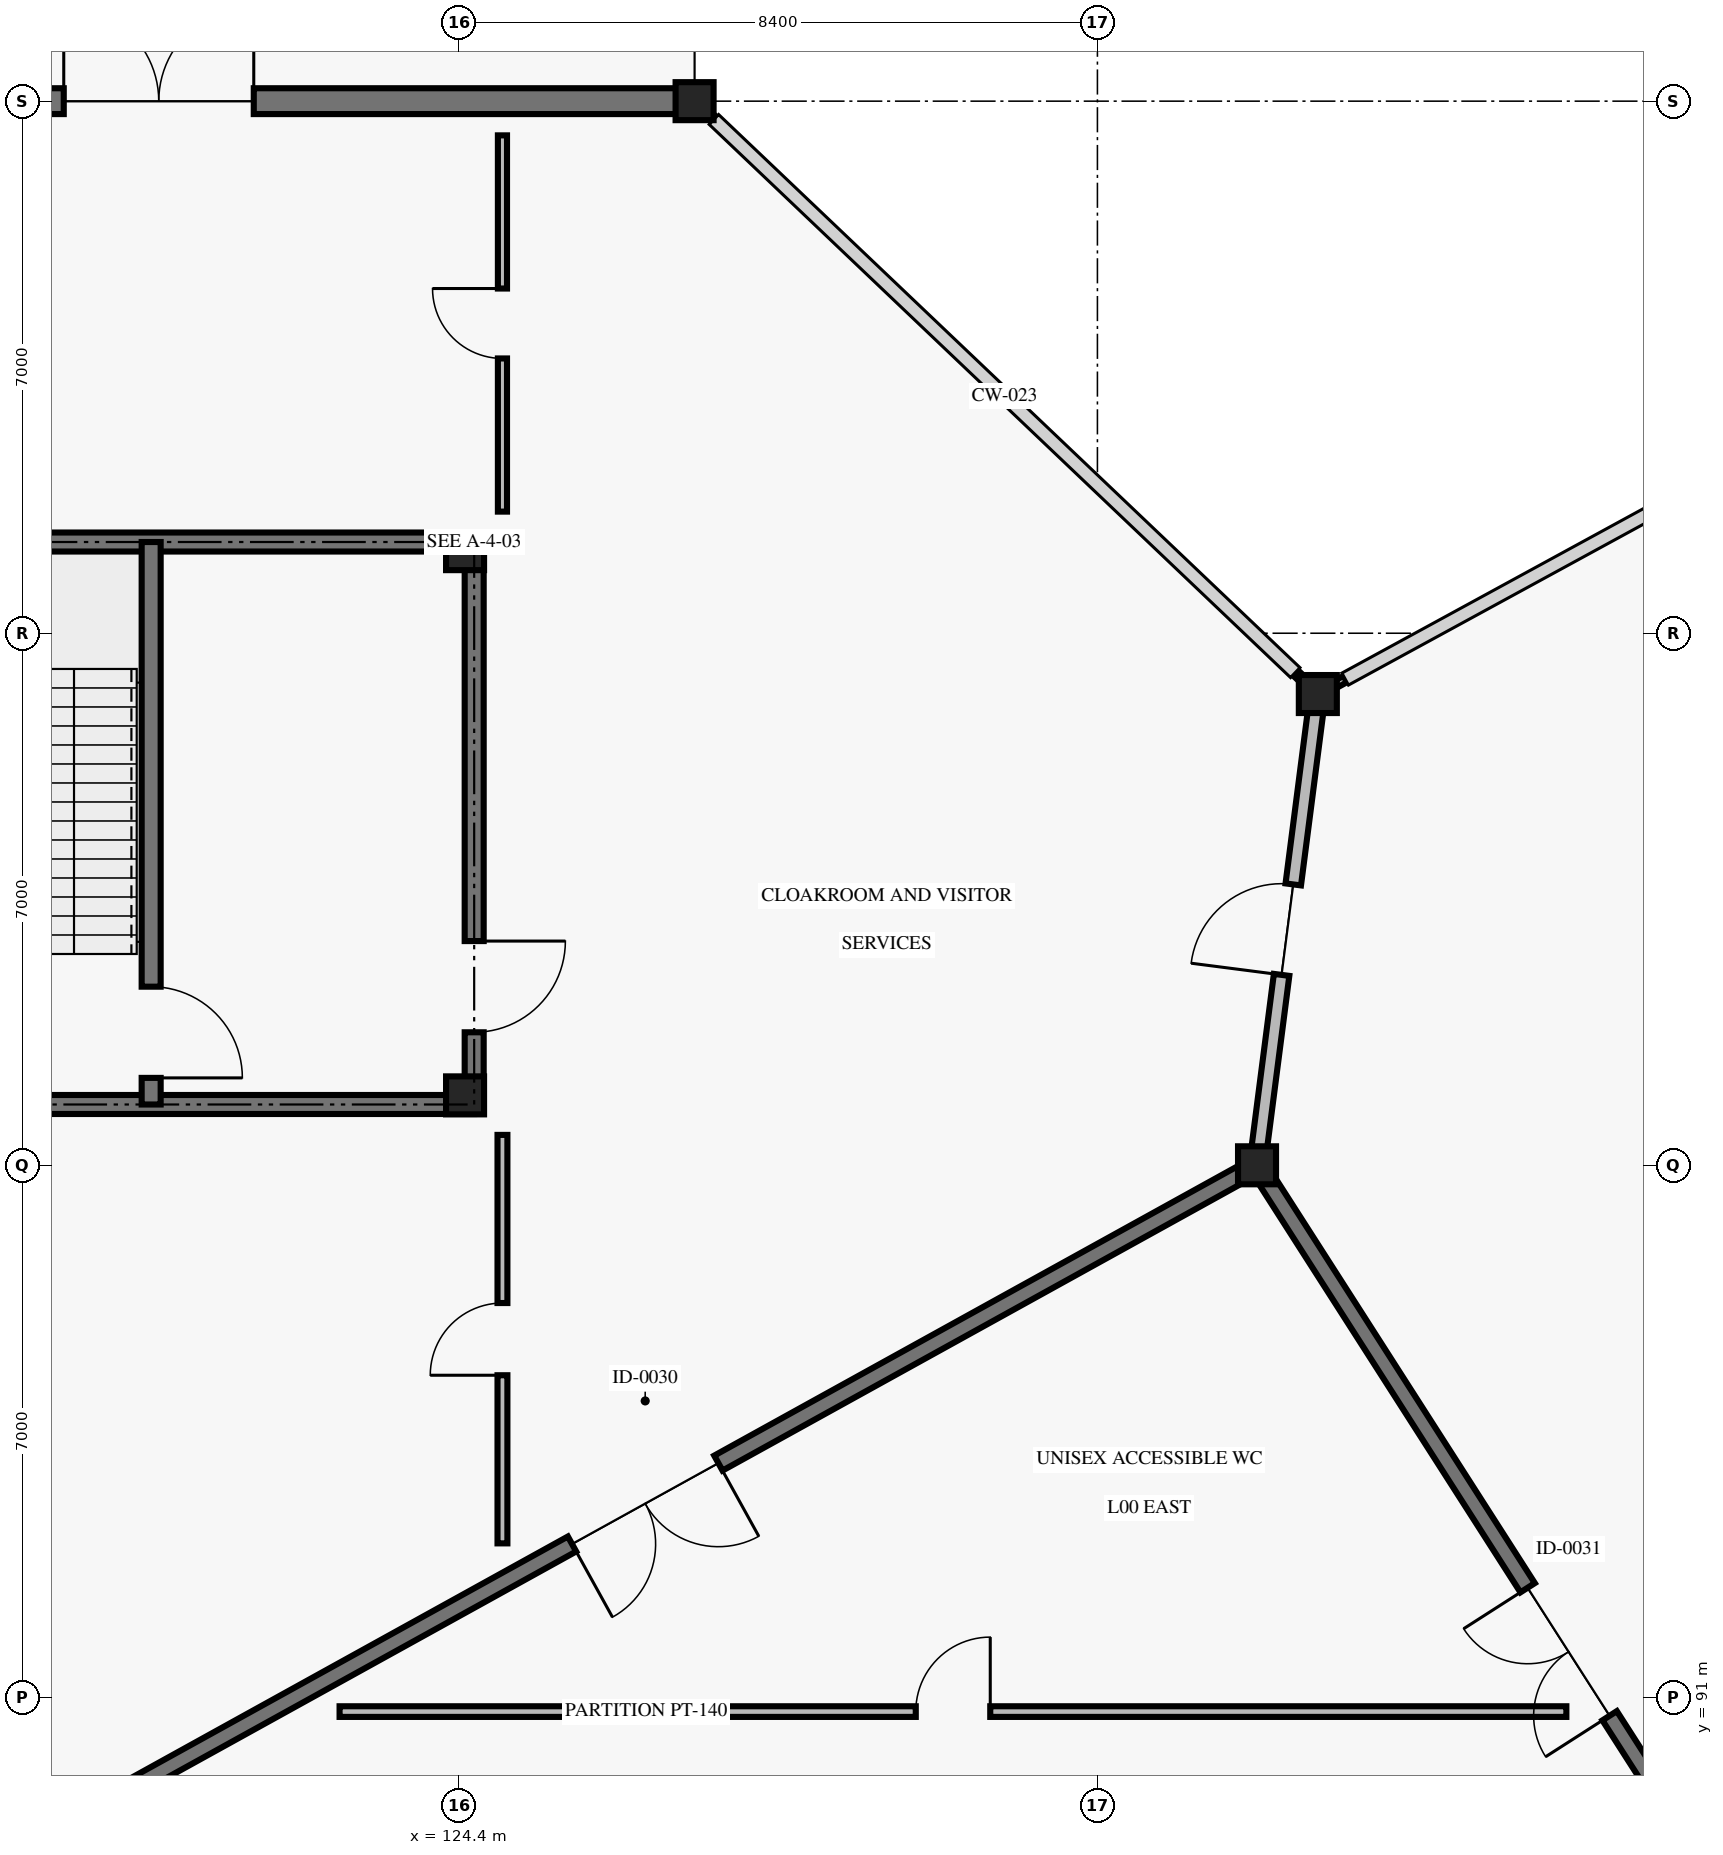
"""IFC4 building model, lengths in metres.
Left out: names, types, materials, properties, quantities, classifications, styles, units other than length and angle.
Written with IfcOpenShell. Run it as: python <this file> out.ifc"""

import sys

from ifc_helpers import new_model, si_unit, direction, frame, frame_2d, origin, origin_2d, place, context, subcontext, project, spatial, rectangle, i_section, extrude, element, fill, save


model = new_model("IFC4")
c1 = context("Model", 3, precision=1e-05, world=origin(), true_north=direction((0.0, 1.0)))
c2 = subcontext(c1, "Body", "Model", "MODEL_VIEW")
j1 = project(units=[si_unit("LENGTHUNIT", "METRE"), si_unit("PLANEANGLEUNIT", "RADIAN")], contexts=[c1])
p1 = place(None, origin())
s1 = spatial("IfcSite", under=j1, at=p1, CompositionType="ELEMENT")
p2 = place(p1, origin())
s2 = spatial("IfcBuilding", under=s1, at=p2, CompositionType="ELEMENT")
p3 = place(p2, origin())
s3 = spatial("IfcBuildingStorey", under=s2, at=p3, CompositionType="ELEMENT", Elevation=0.0)
for number, where, z_axis, x_axis in (
    (1, (127.5, 112.0, 0.0), (0.0, 0.0, 1.0), (1.0, 0.0, 0.0)),
    (2, (134.9, 98.0, 0.0), (0.0, 0.0, 1.0), (1.0, 0.0, 0.0)),
    (3, (135.7, 104.2, 0.0), (0.0, 0.0, 1.0), (1.0, 0.0, 0.0)),
    (4, (124.48, 98.92, 0.0), (0.0, 0.0, 1.0), (1.0, 0.0, 0.0)),
    (5, (124.48, 106.08, 0.0), (0.0, 0.0, 1.0), (1.0, 0.0, 0.0)),
):
    element("IfcColumn", number, at=place(p3, frame(where, z_axis=z_axis, x_axis=x_axis)), inside=s3, PredefinedType="COLUMN", context=c2, shape_type="SweptSolid", body=[
        extrude(i_section(OverallWidth=0.5, OverallDepth=0.5, WebThickness=0.022, FlangeThickness=0.036, at=origin_2d()), origin(), (0.0, 0.0, 1.0), 5.4),
    ])
for number, where, z_axis, x_axis in (
    (6, (127.53, 111.971, 0.0), (0.0, 0.0, 1.0), (0.726, -0.687, 0.0)),
    (7, (135.403, 104.482, 0.0), (0.0, 0.0, 1.0), (0.726, -0.687, 0.0)),
):
    element("IfcWall", number, at=place(p3, frame(where, z_axis=z_axis, x_axis=x_axis)), inside=s3, PredefinedType="SOLIDWALL", context=c2, shape_type="SweptSolid", body=[
        extrude(rectangle(XDim=0.308, YDim=0.095, at=frame_2d((0.154, 0.0))), origin(), (0.0, 0.0, 1.0), 4.22),
    ])
p4 = place(p3, frame((113.4, 112.0, 0.0), z_axis=(0.0, 0.0, 1.0), x_axis=(1.0, 0.0, 0.0)))
e8 = element("IfcWall", 8, at=p4, inside=s3, PredefinedType="SOLIDWALL", context=c2, shape_type="SweptSolid", body=[
    extrude(rectangle(XDim=14.1, YDim=0.34, at=frame_2d((7.05, 0.0))), origin(), (0.0, 0.0, 1.0), 4.22),
])
p5 = place(p4, frame((5.8, 0.0, 0.0)))
e9 = element("IfcOpeningElement", 9, at=p5, cuts=e8, PredefinedType="OPENING", context=c2, shape_type="SweptSolid", body=[
    extrude(rectangle(XDim=2.5, YDim=2.45, at=frame_2d((1.25, 1.225))), frame((0.0, 0.18, 0.0), z_axis=(0.0, -1.0, 0.0), x_axis=(1.0, 0.0, 0.0)), (0.0, 0.0, 1.0), 0.36),
])
p6 = place(p3, frame((135.79, 104.249, 0.0), z_axis=(0.0, 0.0, 1.0), x_axis=(0.876984894636, 0.480517944077, 0.0)))
e10 = element("IfcWall", 10, at=p6, inside=s3, PredefinedType="SOLIDWALL", context=c2, shape_type="SweptSolid", body=[
    extrude(rectangle(XDim=0.308, YDim=0.095, at=frame_2d((0.154, 0.0))), origin(), (0.0, 0.0, 1.0), 4.22),
])
p7 = place(p3, frame((134.9, 98.0, 0.0), z_axis=(0.0, 0.0, 1.0), x_axis=(-0.875181353329, -0.483794996652, 0.0)))
e11 = element("IfcWall", 11, at=p7, inside=s3, PredefinedType="SOLIDWALL", context=c2, shape_type="SweptSolid", body=[
    extrude(rectangle(XDim=18.396, YDim=0.225, at=frame_2d((9.198, 0.0))), origin(), (0.0, 0.0, 1.0), 4.62),
])
p8 = place(p7, frame((8.098, 0.0, 0.0)))
e12 = element("IfcOpeningElement", 12, at=p8, cuts=e11, PredefinedType="OPENING", context=c2, shape_type="SweptSolid", body=[
    extrude(rectangle(XDim=2.2, YDim=2.6, at=frame_2d((1.1, 1.3))), frame((0.0, 0.123, 0.0), z_axis=(0.0, -1.0, 0.0), x_axis=(1.0, 0.0, 0.0)), (0.0, 0.0, 1.0), 0.245),
])
p9 = place(p3, frame((143.1, 85.2, 0.0), z_axis=(0.0, 0.0, 1.0), x_axis=(-0.539434641352, 0.842027474439, 0.0)))
e13 = element("IfcWall", 13, at=p9, inside=s3, PredefinedType="SOLIDWALL", context=c2, shape_type="SweptSolid", body=[
    extrude(rectangle(XDim=15.201, YDim=0.225, at=frame_2d((7.601, 0.0))), origin(), (0.0, 0.0, 1.0), 4.62),
])
p10 = place(p9, frame((6.601, 0.0, 0.0)))
e14 = element("IfcOpeningElement", 14, at=p10, cuts=e13, PredefinedType="OPENING", context=c2, shape_type="SweptSolid", body=[
    extrude(rectangle(XDim=2.0, YDim=2.5, at=frame_2d((1.0, 1.25))), frame((0.0, 0.123, 0.0), z_axis=(0.0, -1.0, 0.0), x_axis=(1.0, 0.0, 0.0)), (0.0, 0.0, 1.0), 0.245),
])
p11 = place(p3, frame((134.9, 98.0, 0.0), z_axis=(0.0, 0.0, 1.0), x_axis=(0.127980011854, 0.991776747341, 0.0)))
e15 = element("IfcWall", 15, at=p11, inside=s3, PredefinedType="SOLIDWALL", context=c2, shape_type="SweptSolid", body=[
    extrude(rectangle(XDim=6.251, YDim=0.205, at=frame_2d((3.126, 0.0))), origin(), (0.0, 0.0, 1.0), 3.92),
])
p12 = place(p11, frame((2.526, 0.0, 0.0)))
e16 = element("IfcOpeningElement", 16, at=p12, cuts=e15, PredefinedType="OPENING", context=c2, shape_type="SweptSolid", body=[
    extrude(rectangle(XDim=1.2, YDim=2.2, at=frame_2d((0.6, 1.1))), frame((0.0, 0.113, 0.0), z_axis=(0.0, -1.0, 0.0), x_axis=(1.0, 0.0, 0.0)), (0.0, 0.0, 1.0), 0.225),
])
p13 = place(p3, frame((122.829, 90.813, 0.0), z_axis=(0.0, 0.0, 1.0), x_axis=(1.0, 0.0, 0.0)))
e17 = element("IfcWall", 17, at=p13, inside=s3, PredefinedType="PARTITIONING", context=c2, shape_type="SweptSolid", body=[
    extrude(rectangle(XDim=16.141, YDim=0.14, at=frame_2d((8.07, 0.0))), origin(), (0.0, 0.0, 1.0), 3.92),
])
p14 = place(p13, frame((7.581, 0.0, 0.0)))
e18 = element("IfcOpeningElement", 18, at=p14, cuts=e17, PredefinedType="OPENING", context=c2, shape_type="SweptSolid", body=[
    extrude(rectangle(XDim=0.98, YDim=2.15, at=frame_2d((0.49, 1.075))), frame((0.0, 0.08, 0.0), z_axis=(0.0, -1.0, 0.0), x_axis=(1.0, 0.0, 0.0)), (0.0, 0.0, 1.0), 0.16),
])
p15 = place(p3, frame((124.972, 93.026, 0.0), z_axis=(0.0, 0.0, 1.0), x_axis=(0.0, 1.0, 0.0)))
e19 = element("IfcWall", 19, at=p15, inside=s3, PredefinedType="PARTITIONING", context=c2, shape_type="SweptSolid", body=[
    extrude(rectangle(XDim=5.374, YDim=0.13, at=frame_2d((2.687, 0.0))), origin(), (0.0, 0.0, 1.0), 3.92),
])
p16 = place(p15, frame((2.212, 0.0, 0.0)))
e20 = element("IfcOpeningElement", 20, at=p16, cuts=e19, PredefinedType="OPENING", context=c2, shape_type="SweptSolid", body=[
    extrude(rectangle(XDim=0.95, YDim=2.15, at=frame_2d((0.475, 1.075))), frame((0.0, 0.075, 0.0), z_axis=(0.0, -1.0, 0.0), x_axis=(1.0, 0.0, 0.0)), (0.0, 0.0, 1.0), 0.15),
])
p17 = place(p3, frame((124.972, 106.6, 0.0), z_axis=(0.0, 0.0, 1.0), x_axis=(0.0, 1.0, 0.0)))
e21 = element("IfcWall", 21, at=p17, inside=s3, PredefinedType="PARTITIONING", context=c2, shape_type="SweptSolid", body=[
    extrude(rectangle(XDim=4.95, YDim=0.12, at=frame_2d((2.475, 0.0))), origin(), (0.0, 0.0, 1.0), 3.92),
])
p18 = place(p17, frame((2.015, 0.0, 0.0)))
e22 = element("IfcOpeningElement", 22, at=p18, cuts=e21, PredefinedType="OPENING", context=c2, shape_type="SweptSolid", body=[
    extrude(rectangle(XDim=0.92, YDim=2.1, at=frame_2d((0.46, 1.05))), frame((0.0, 0.07, 0.0), z_axis=(0.0, -1.0, 0.0), x_axis=(1.0, 0.0, 0.0)), (0.0, 0.0, 1.0), 0.14),
])
for number, where, z_axis, x_axis in (
    (23, (115.4, 106.2, 0.0), (0.0, 0.0, 1.0), (1.0, 0.0, 0.0)),
    (24, (124.6, 98.8, 0.0), (0.0, 0.0, 1.0), (-1.0, 0.0, 0.0)),
):
    element("IfcWall", number, at=place(p3, frame(where, z_axis=z_axis, x_axis=x_axis)), inside=s3, PredefinedType="SHEAR", context=c2, shape_type="SweptSolid", body=[
        extrude(rectangle(XDim=9.2, YDim=0.25, at=frame_2d((4.6, 0.0))), origin(), (0.0, 0.0, 1.0), 5.16),
    ])
p19 = place(p3, frame((124.6, 106.2, 0.0), z_axis=(0.0, 0.0, 1.0), x_axis=(0.0, -1.0, 0.0)))
e25 = element("IfcWall", 25, at=p19, inside=s3, PredefinedType="SHEAR", context=c2, shape_type="SweptSolid", body=[
    extrude(rectangle(XDim=7.4, YDim=0.25, at=frame_2d((3.7, 0.0))), origin(), (0.0, 0.0, 1.0), 5.16),
])
p20 = place(p19, frame((5.25, 0.0, 0.0)))
e26 = element("IfcOpeningElement", 26, at=p20, cuts=e25, PredefinedType="OPENING", context=c2, shape_type="SweptSolid", body=[
    extrude(rectangle(XDim=1.2, YDim=2.2, at=frame_2d((0.6, 1.1))), frame((0.0, 0.135, 0.0), z_axis=(0.0, -1.0, 0.0), x_axis=(1.0, 0.0, 0.0)), (0.0, 0.0, 1.0), 0.27),
])
p21 = place(p3, frame((120.35, 106.2, 0.0), z_axis=(0.0, 0.0, 1.0), x_axis=(0.0, -1.0, 0.0)))
e27 = element("IfcWall", 27, at=p21, inside=s3, PredefinedType="SHEAR", context=c2, shape_type="SweptSolid", body=[
    extrude(rectangle(XDim=7.4, YDim=0.25, at=frame_2d((3.7, 0.0))), origin(), (0.0, 0.0, 1.0), 5.16),
])
p22 = place(p21, frame((5.85, 0.0, 0.0)))
e28 = element("IfcOpeningElement", 28, at=p22, cuts=e27, PredefinedType="OPENING", context=c2, shape_type="SweptSolid", body=[
    extrude(rectangle(XDim=1.2, YDim=2.2, at=frame_2d((0.6, 1.1))), frame((0.0, 0.135, 0.0), z_axis=(0.0, -1.0, 0.0), x_axis=(1.0, 0.0, 0.0)), (0.0, 0.0, 1.0), 0.27),
])
p23 = place(p5, origin())
e29 = element("IfcDoor", 29, at=p23, inside=s3, OperationType="DOUBLE_DOOR_SINGLE_SWING", PredefinedType="DOOR", context=c2, shape_type="SweptSolid", body=[
    extrude(rectangle(XDim=2.5, YDim=2.45, at=frame_2d((1.25, 1.225))), frame((0.0, 0.025, 0.0), z_axis=(0.0, -1.0, 0.0), x_axis=(1.0, 0.0, 0.0)), (0.0, 0.0, 1.0), 0.05),
])
fill(e9, e29)
p24 = place(p8, origin())
e30 = element("IfcDoor", 30, at=p24, inside=s3, OperationType="DOUBLE_DOOR_SINGLE_SWING", PredefinedType="DOOR", context=c2, shape_type="SweptSolid", body=[
    extrude(rectangle(XDim=2.2, YDim=2.6, at=frame_2d((1.1, 1.3))), frame((0.0, 0.025, 0.0), z_axis=(0.0, -1.0, 0.0), x_axis=(1.0, 0.0, 0.0)), (0.0, 0.0, 1.0), 0.05),
])
fill(e12, e30)
p25 = place(p10, origin())
e31 = element("IfcDoor", 31, at=p25, inside=s3, OperationType="DOUBLE_DOOR_SINGLE_SWING", PredefinedType="DOOR", context=c2, shape_type="SweptSolid", body=[
    extrude(rectangle(XDim=2.0, YDim=2.5, at=frame_2d((1.0, 1.25))), frame((0.0, 0.025, 0.0), z_axis=(0.0, -1.0, 0.0), x_axis=(1.0, 0.0, 0.0)), (0.0, 0.0, 1.0), 0.05),
])
fill(e14, e31)
p26 = place(p12, origin())
e32 = element("IfcDoor", 32, at=p26, inside=s3, OperationType="SINGLE_SWING_LEFT", PredefinedType="DOOR", context=c2, shape_type="SweptSolid", body=[
    extrude(rectangle(XDim=1.2, YDim=2.2, at=frame_2d((0.6, 1.1))), frame((0.0, 0.025, 0.0), z_axis=(0.0, -1.0, 0.0), x_axis=(1.0, 0.0, 0.0)), (0.0, 0.0, 1.0), 0.05),
])
fill(e16, e32)
p27 = place(p14, origin())
e33 = element("IfcDoor", 33, at=p27, inside=s3, OperationType="SINGLE_SWING_RIGHT", PredefinedType="DOOR", context=c2, shape_type="SweptSolid", body=[
    extrude(rectangle(XDim=0.98, YDim=2.15, at=frame_2d((0.49, 1.075))), frame((0.0, 0.025, 0.0), z_axis=(0.0, -1.0, 0.0), x_axis=(1.0, 0.0, 0.0)), (0.0, 0.0, 1.0), 0.05),
])
fill(e18, e33)
p28 = place(p16, origin())
e34 = element("IfcDoor", 34, at=p28, inside=s3, OperationType="SINGLE_SWING_LEFT", PredefinedType="DOOR", context=c2, shape_type="SweptSolid", body=[
    extrude(rectangle(XDim=0.95, YDim=2.15, at=frame_2d((0.475, 1.075))), frame((0.0, 0.025, 0.0), z_axis=(0.0, -1.0, 0.0), x_axis=(1.0, 0.0, 0.0)), (0.0, 0.0, 1.0), 0.05),
])
fill(e20, e34)
p29 = place(p18, origin())
e35 = element("IfcDoor", 35, at=p29, inside=s3, OperationType="SINGLE_SWING_RIGHT", PredefinedType="DOOR", context=c2, shape_type="SweptSolid", body=[
    extrude(rectangle(XDim=0.92, YDim=2.1, at=frame_2d((0.46, 1.05))), frame((0.0, 0.025, 0.0), z_axis=(0.0, -1.0, 0.0), x_axis=(1.0, 0.0, 0.0)), (0.0, 0.0, 1.0), 0.05),
])
fill(e22, e35)
p30 = place(p20, origin())
e36 = element("IfcDoor", 36, at=p30, inside=s3, OperationType="SINGLE_SWING_LEFT", PredefinedType="DOOR", context=c2, shape_type="SweptSolid", body=[
    extrude(rectangle(XDim=1.2, YDim=2.2, at=frame_2d((0.6, 1.1))), frame((0.0, 0.025, 0.0), z_axis=(0.0, -1.0, 0.0), x_axis=(1.0, 0.0, 0.0)), (0.0, 0.0, 1.0), 0.05),
])
fill(e26, e36)
p31 = place(p22, origin())
e37 = element("IfcDoor", 37, at=p31, inside=s3, OperationType="SINGLE_SWING_RIGHT", PredefinedType="DOOR", context=c2, shape_type="SweptSolid", body=[
    extrude(rectangle(XDim=1.2, YDim=2.2, at=frame_2d((0.6, 1.1))), frame((0.0, 0.025, 0.0), z_axis=(0.0, -1.0, 0.0), x_axis=(1.0, 0.0, 0.0)), (0.0, 0.0, 1.0), 0.05),
])
fill(e28, e37)
save(model, sys.argv[1])
